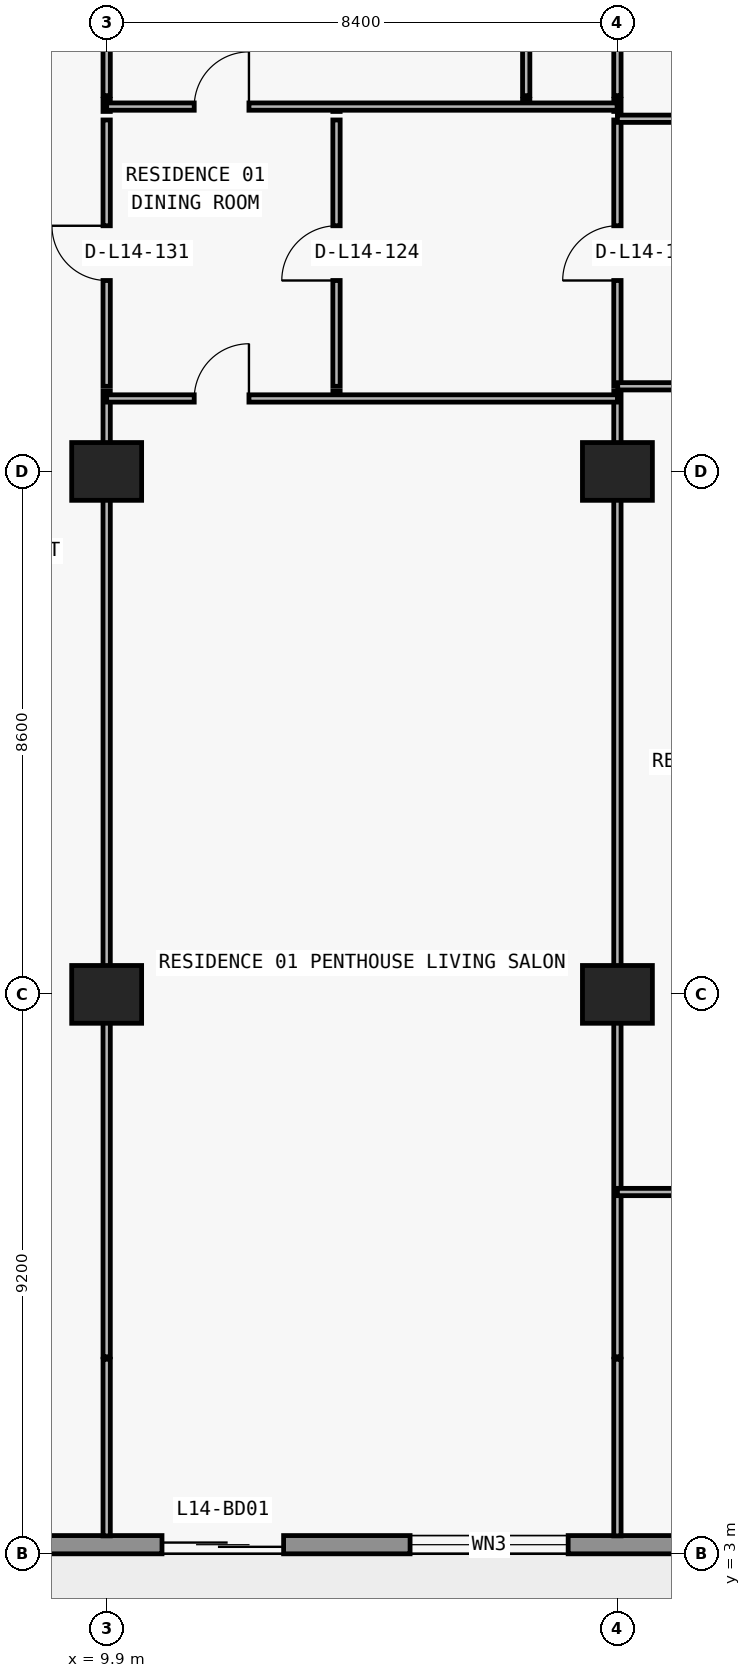
"""IFC4 building model, lengths in metres.
Left out: names, types, materials, properties, quantities, classifications, styles, units other than length and angle.
Written with IfcOpenShell. Run it as: python <this file> out.ifc"""

import sys

from ifc_helpers import new_model, si_unit, direction, frame, frame_2d, origin, origin_2d, place, context, subcontext, project, spatial, rectangle, extrude, element, fill, save


model = new_model("IFC4")
c1 = context("Model", 3, precision=1e-05, world=origin(), true_north=direction((0.0, 1.0)))
c2 = subcontext(c1, "Body", "Model", "MODEL_VIEW")
j1 = project(units=[si_unit("LENGTHUNIT", "METRE"), si_unit("PLANEANGLEUNIT", "RADIAN")], contexts=[c1])
p1 = place(None, origin())
s1 = spatial("IfcSite", under=j1, at=p1, CompositionType="ELEMENT")
p2 = place(p1, origin())
s2 = spatial("IfcBuilding", under=s1, at=p2, CompositionType="ELEMENT")
p3 = place(p2, frame((0.0, 0.0, 56.4)))
s3 = spatial("IfcBuildingStorey", under=s2, at=p3, CompositionType="ELEMENT", Elevation=56.4)
for number, where, z_axis, x_axis in (
    (1, (9.9, 12.2, 0.0), (0.0, 0.0, 1.0), (1.0, 0.0, 0.0)),
    (2, (18.3, 12.2, 0.0), (0.0, 0.0, 1.0), (1.0, 0.0, 0.0)),
    (3, (9.9, 20.8, 0.0), (0.0, 0.0, 1.0), (1.0, 0.0, 0.0)),
    (4, (18.3, 20.8, 0.0), (0.0, 0.0, 1.0), (1.0, 0.0, 0.0)),
):
    element("IfcColumn", number, at=place(p3, frame(where, z_axis=z_axis, x_axis=x_axis)), inside=s3, PredefinedType="COLUMN", context=c2, shape_type="SweptSolid", body=[
        extrude(rectangle(XDim=1.15, YDim=0.95, at=origin_2d()), origin(), (0.0, 0.0, 1.0), 3.05),
    ])
p4 = place(p3, frame((72.7, 3.15, 0.0), z_axis=(0.0, 0.0, 1.0), x_axis=(-1.0, 0.0, 0.0)))
e5 = element("IfcWall", 5, at=p4, inside=s3, PredefinedType="STANDARD", context=c2, shape_type="SweptSolid", body=[
    extrude(rectangle(XDim=67.6, YDim=0.3, at=frame_2d((33.8, 0.0))), origin(), (0.0, 0.0, 1.0), 3.05),
])
p5 = place(p4, frame((59.89, 0.0, 0.0)))
e6 = element("IfcOpeningElement", 6, at=p5, cuts=e5, PredefinedType="OPENING", context=c2, shape_type="SweptSolid", body=[
    extrude(rectangle(XDim=2.0, YDim=2.3, at=frame_2d((1.0, 1.15))), frame((0.0, 0.16, 0.0), z_axis=(0.0, -1.0, 0.0), x_axis=(1.0, 0.0, 0.0)), (0.0, 0.0, 1.0), 0.32),
])
p6 = place(p4, frame((55.21, 0.0, 0.65)))
e7 = element("IfcOpeningElement", 7, at=p6, cuts=e5, PredefinedType="OPENING", context=c2, shape_type="SweptSolid", body=[
    extrude(rectangle(XDim=2.6, YDim=1.85, at=frame_2d((1.3, 0.925))), frame((0.0, 0.16, 0.0), z_axis=(0.0, -1.0, 0.0), x_axis=(1.0, 0.0, 0.0)), (0.0, 0.0, 1.0), 0.32),
])
p7 = place(p4, frame((49.1, 0.0, 0.85)))
e8 = element("IfcOpeningElement", 8, at=p7, cuts=e5, PredefinedType="OPENING", context=c2, shape_type="SweptSolid", body=[
    extrude(rectangle(XDim=2.2, YDim=1.55, at=frame_2d((1.1, 0.775))), frame((0.0, 0.16, 0.0), z_axis=(0.0, -1.0, 0.0), x_axis=(1.0, 0.0, 0.0)), (0.0, 0.0, 1.0), 0.32),
])
p8 = place(p4, frame((43.09, 0.0, 0.0)))
e9 = element("IfcOpeningElement", 9, at=p8, cuts=e5, PredefinedType="OPENING", context=c2, shape_type="SweptSolid", body=[
    extrude(rectangle(XDim=2.0, YDim=2.3, at=frame_2d((1.0, 1.15))), frame((0.0, 0.16, 0.0), z_axis=(0.0, -1.0, 0.0), x_axis=(1.0, 0.0, 0.0)), (0.0, 0.0, 1.0), 0.32),
])
p9 = place(p4, frame((38.41, 0.0, 0.65)))
e10 = element("IfcOpeningElement", 10, at=p9, cuts=e5, PredefinedType="OPENING", context=c2, shape_type="SweptSolid", body=[
    extrude(rectangle(XDim=2.6, YDim=1.85, at=frame_2d((1.3, 0.925))), frame((0.0, 0.16, 0.0), z_axis=(0.0, -1.0, 0.0), x_axis=(1.0, 0.0, 0.0)), (0.0, 0.0, 1.0), 0.32),
])
p10 = place(p4, frame((32.7, 0.0, 0.85)))
e11 = element("IfcOpeningElement", 11, at=p10, cuts=e5, PredefinedType="OPENING", context=c2, shape_type="SweptSolid", body=[
    extrude(rectangle(XDim=2.2, YDim=1.55, at=frame_2d((1.1, 0.775))), frame((0.0, 0.16, 0.0), z_axis=(0.0, -1.0, 0.0), x_axis=(1.0, 0.0, 0.0)), (0.0, 0.0, 1.0), 0.32),
])
p11 = place(p4, frame((27.026, 0.0, 0.0)))
e12 = element("IfcOpeningElement", 12, at=p11, cuts=e5, PredefinedType="OPENING", context=c2, shape_type="SweptSolid", body=[
    extrude(rectangle(XDim=2.0, YDim=2.3, at=frame_2d((1.0, 1.15))), frame((0.0, 0.16, 0.0), z_axis=(0.0, -1.0, 0.0), x_axis=(1.0, 0.0, 0.0)), (0.0, 0.0, 1.0), 0.32),
])
p12 = place(p4, frame((22.726, 0.0, 0.85)))
e13 = element("IfcOpeningElement", 13, at=p12, cuts=e5, PredefinedType="OPENING", context=c2, shape_type="SweptSolid", body=[
    extrude(rectangle(XDim=2.2, YDim=1.55, at=frame_2d((1.1, 0.775))), frame((0.0, 0.16, 0.0), z_axis=(0.0, -1.0, 0.0), x_axis=(1.0, 0.0, 0.0)), (0.0, 0.0, 1.0), 0.32),
])
p13 = place(p4, frame((18.29, 0.0, 0.0)))
e14 = element("IfcOpeningElement", 14, at=p13, cuts=e5, PredefinedType="OPENING", context=c2, shape_type="SweptSolid", body=[
    extrude(rectangle(XDim=2.0, YDim=2.3, at=frame_2d((1.0, 1.15))), frame((0.0, 0.16, 0.0), z_axis=(0.0, -1.0, 0.0), x_axis=(1.0, 0.0, 0.0)), (0.0, 0.0, 1.0), 0.32),
])
p14 = place(p4, frame((14.19, 0.0, 0.85)))
e15 = element("IfcOpeningElement", 15, at=p14, cuts=e5, PredefinedType="OPENING", context=c2, shape_type="SweptSolid", body=[
    extrude(rectangle(XDim=1.8, YDim=1.55, at=frame_2d((0.9, 0.775))), frame((0.0, 0.16, 0.0), z_axis=(0.0, -1.0, 0.0), x_axis=(1.0, 0.0, 0.0)), (0.0, 0.0, 1.0), 0.32),
])
p15 = place(p4, frame((10.226, 0.0, 0.0)))
e16 = element("IfcOpeningElement", 16, at=p15, cuts=e5, PredefinedType="OPENING", context=c2, shape_type="SweptSolid", body=[
    extrude(rectangle(XDim=2.0, YDim=2.3, at=frame_2d((1.0, 1.15))), frame((0.0, 0.16, 0.0), z_axis=(0.0, -1.0, 0.0), x_axis=(1.0, 0.0, 0.0)), (0.0, 0.0, 1.0), 0.32),
])
p16 = place(p4, frame((5.926, 0.0, 0.85)))
e17 = element("IfcOpeningElement", 17, at=p16, cuts=e5, PredefinedType="OPENING", context=c2, shape_type="SweptSolid", body=[
    extrude(rectangle(XDim=2.2, YDim=1.55, at=frame_2d((1.1, 0.775))), frame((0.0, 0.16, 0.0), z_axis=(0.0, -1.0, 0.0), x_axis=(1.0, 0.0, 0.0)), (0.0, 0.0, 1.0), 0.32),
])
p17 = place(p3, frame((9.9, 3.295, 0.0), z_axis=(0.0, 0.0, 1.0), x_axis=(0.0, 1.0, 0.0)))
e18 = element("IfcWall", 18, at=p17, inside=s3, PredefinedType="PARTITIONING", context=c2, shape_type="SweptSolid", body=[
    extrude(rectangle(XDim=2.905, YDim=0.12, at=frame_2d((1.453, 0.0))), origin(), (0.0, 0.0, 1.0), 3.05),
])
p18 = place(p3, frame((9.9, 6.24, 0.0), z_axis=(0.0, 0.0, 1.0), x_axis=(0.0, 1.0, 0.0)))
e19 = element("IfcWall", 19, at=p18, inside=s3, PredefinedType="PARTITIONING", context=c2, shape_type="SweptSolid", body=[
    extrude(rectangle(XDim=15.88, YDim=0.12, at=frame_2d((7.94, 0.0))), origin(), (0.0, 0.0, 1.0), 2.11),
])
p19 = place(p3, frame((9.9, 22.2, 0.0), z_axis=(0.0, 0.0, 1.0), x_axis=(0.0, 1.0, 0.0)))
e20 = element("IfcWall", 20, at=p19, inside=s3, PredefinedType="PARTITIONING", context=c2, shape_type="SweptSolid", body=[
    extrude(rectangle(XDim=4.38, YDim=0.12, at=frame_2d((2.19, 0.0))), origin(), (0.0, 0.0, 1.0), 2.11),
])
p20 = place(p19, frame((1.74, 0.0, 0.0)))
e21 = element("IfcOpeningElement", 21, at=p20, cuts=e20, PredefinedType="OPENING", context=c2, shape_type="SweptSolid", body=[
    extrude(rectangle(XDim=0.9, YDim=2.06, at=frame_2d((0.45, 1.03))), frame((0.0, 0.07, 0.0), z_axis=(0.0, -1.0, 0.0), x_axis=(1.0, 0.0, 0.0)), (0.0, 0.0, 1.0), 0.14),
])
p21 = place(p3, frame((9.9, 26.72, 0.0), z_axis=(0.0, 0.0, 1.0), x_axis=(0.0, 1.0, 0.0)))
e22 = element("IfcWall", 22, at=p21, inside=s3, PredefinedType="PARTITIONING", context=c2, shape_type="SweptSolid", body=[
    extrude(rectangle(XDim=0.2, YDim=0.12, at=frame_2d((0.1, 0.0))), origin(), (0.0, 0.0, 1.0), 2.11),
])
p22 = place(p3, frame((9.9, 26.98, 0.0), z_axis=(0.0, 0.0, 1.0), x_axis=(0.0, 1.0, 0.0)))
e23 = element("IfcWall", 23, at=p22, inside=s3, PredefinedType="PARTITIONING", context=c2, shape_type="SweptSolid", body=[
    extrude(rectangle(XDim=6.82, YDim=0.12, at=frame_2d((3.41, 0.0))), origin(), (0.0, 0.0, 1.0), 2.11),
])
p23 = place(p3, frame((13.68, 22.0, 0.0), z_axis=(0.0, 0.0, 1.0), x_axis=(0.0, 1.0, 0.0)))
e24 = element("IfcWall", 24, at=p23, inside=s3, PredefinedType="PARTITIONING", context=c2, shape_type="SweptSolid", body=[
    extrude(rectangle(XDim=0.12, YDim=0.12, at=frame_2d((0.06, 0.0))), origin(), (0.0, 0.0, 1.0), 3.05),
])
p24 = place(p3, frame((13.68, 22.2, 0.0), z_axis=(0.0, 0.0, 1.0), x_axis=(0.0, 1.0, 0.0)))
e25 = element("IfcWall", 25, at=p24, inside=s3, PredefinedType="PARTITIONING", context=c2, shape_type="SweptSolid", body=[
    extrude(rectangle(XDim=4.38, YDim=0.12, at=frame_2d((2.19, 0.0))), origin(), (0.0, 0.0, 1.0), 3.05),
])
p25 = place(p24, frame((1.74, 0.0, 0.0)))
e26 = element("IfcOpeningElement", 26, at=p25, cuts=e25, PredefinedType="OPENING", context=c2, shape_type="SweptSolid", body=[
    extrude(rectangle(XDim=0.9, YDim=2.15, at=frame_2d((0.45, 1.075))), frame((0.0, 0.07, 0.0), z_axis=(0.0, -1.0, 0.0), x_axis=(1.0, 0.0, 0.0)), (0.0, 0.0, 1.0), 0.14),
])
p26 = place(p3, frame((13.68, 26.72, 0.0), z_axis=(0.0, 0.0, 1.0), x_axis=(0.0, 1.0, 0.0)))
e27 = element("IfcWall", 27, at=p26, inside=s3, PredefinedType="PARTITIONING", context=c2, shape_type="SweptSolid", body=[
    extrude(rectangle(XDim=0.08, YDim=0.12, at=frame_2d((0.04, 0.0))), origin(), (0.0, 0.0, 1.0), 3.05),
])
p27 = place(p3, frame((16.8, 26.8, 0.0), z_axis=(0.0, 0.0, 1.0), x_axis=(0.0, 1.0, 0.0)))
e28 = element("IfcWall", 28, at=p27, inside=s3, PredefinedType="PARTITIONING", context=c2, shape_type="SweptSolid", body=[
    extrude(rectangle(XDim=0.12, YDim=0.12, at=frame_2d((0.06, 0.0))), origin(), (0.0, 0.0, 1.0), 3.05),
])
p28 = place(p3, frame((16.8, 26.98, 0.0), z_axis=(0.0, 0.0, 1.0), x_axis=(0.0, 1.0, 0.0)))
e29 = element("IfcWall", 29, at=p28, inside=s3, PredefinedType="PARTITIONING", context=c2, shape_type="SweptSolid", body=[
    extrude(rectangle(XDim=6.82, YDim=0.12, at=frame_2d((3.41, 0.0))), origin(), (0.0, 0.0, 1.0), 3.05),
])
p29 = place(p28, frame((3.435, 0.0, 0.0)))
e30 = element("IfcOpeningElement", 30, at=p29, cuts=e29, PredefinedType="OPENING", context=c2, shape_type="SweptSolid", body=[
    extrude(rectangle(XDim=0.85, YDim=2.1, at=frame_2d((0.425, 1.05))), frame((0.0, 0.07, 0.0), z_axis=(0.0, -1.0, 0.0), x_axis=(1.0, 0.0, 0.0)), (0.0, 0.0, 1.0), 0.14),
])
p30 = place(p3, frame((18.3, 3.295, 0.0), z_axis=(0.0, 0.0, 1.0), x_axis=(0.0, 1.0, 0.0)))
e31 = element("IfcWall", 31, at=p30, inside=s3, PredefinedType="PARTITIONING", context=c2, shape_type="SweptSolid", body=[
    extrude(rectangle(XDim=2.905, YDim=0.12, at=frame_2d((1.453, 0.0))), origin(), (0.0, 0.0, 1.0), 3.05),
])
p31 = place(p3, frame((18.3, 6.24, 0.0), z_axis=(0.0, 0.0, 1.0), x_axis=(0.0, 1.0, 0.0)))
e32 = element("IfcWall", 32, at=p31, inside=s3, PredefinedType="PARTITIONING", context=c2, shape_type="SweptSolid", body=[
    extrude(rectangle(XDim=15.88, YDim=0.12, at=frame_2d((7.94, 0.0))), origin(), (0.0, 0.0, 1.0), 2.11),
])
p32 = place(p3, frame((18.3, 22.2, 0.0), z_axis=(0.0, 0.0, 1.0), x_axis=(0.0, 1.0, 0.0)))
e33 = element("IfcWall", 33, at=p32, inside=s3, PredefinedType="PARTITIONING", context=c2, shape_type="SweptSolid", body=[
    extrude(rectangle(XDim=4.38, YDim=0.12, at=frame_2d((2.19, 0.0))), origin(), (0.0, 0.0, 1.0), 2.11),
])
p33 = place(p32, frame((1.74, 0.0, 0.0)))
e34 = element("IfcOpeningElement", 34, at=p33, cuts=e33, PredefinedType="OPENING", context=c2, shape_type="SweptSolid", body=[
    extrude(rectangle(XDim=0.9, YDim=2.06, at=frame_2d((0.45, 1.03))), frame((0.0, 0.07, 0.0), z_axis=(0.0, -1.0, 0.0), x_axis=(1.0, 0.0, 0.0)), (0.0, 0.0, 1.0), 0.14),
])
p34 = place(p3, frame((18.3, 26.72, 0.0), z_axis=(0.0, 0.0, 1.0), x_axis=(0.0, 1.0, 0.0)))
e35 = element("IfcWall", 35, at=p34, inside=s3, PredefinedType="PARTITIONING", context=c2, shape_type="SweptSolid", body=[
    extrude(rectangle(XDim=0.2, YDim=0.12, at=frame_2d((0.1, 0.0))), origin(), (0.0, 0.0, 1.0), 2.11),
])
p35 = place(p3, frame((18.3, 26.98, 0.0), z_axis=(0.0, 0.0, 1.0), x_axis=(0.0, 1.0, 0.0)))
e36 = element("IfcWall", 36, at=p35, inside=s3, PredefinedType="PARTITIONING", context=c2, shape_type="SweptSolid", body=[
    extrude(rectangle(XDim=6.82, YDim=0.12, at=frame_2d((3.41, 0.0))), origin(), (0.0, 0.0, 1.0), 2.11),
])
p36 = place(p3, frame((18.3, 8.95, 0.0), z_axis=(0.0, 0.0, 1.0), x_axis=(1.0, 0.0, 0.0)))
e37 = element("IfcWall", 37, at=p36, inside=s3, PredefinedType="PARTITIONING", context=c2, shape_type="SweptSolid", body=[
    extrude(rectangle(XDim=8.4, YDim=0.12, at=frame_2d((4.2, 0.0))), origin(), (0.0, 0.0, 1.0), 3.05),
])
p37 = place(p36, frame((3.75, 0.0, 0.0)))
e38 = element("IfcOpeningElement", 38, at=p37, cuts=e37, PredefinedType="OPENING", context=c2, shape_type="SweptSolid", body=[
    extrude(rectangle(XDim=0.9, YDim=2.15, at=frame_2d((0.45, 1.075))), frame((0.0, 0.07, 0.0), z_axis=(0.0, -1.0, 0.0), x_axis=(1.0, 0.0, 0.0)), (0.0, 0.0, 1.0), 0.14),
])
p38 = place(p3, frame((9.9, 22.0, 0.0), z_axis=(0.0, 0.0, 1.0), x_axis=(1.0, 0.0, 0.0)))
e39 = element("IfcWall", 39, at=p38, inside=s3, PredefinedType="PARTITIONING", context=c2, shape_type="SweptSolid", body=[
    extrude(rectangle(XDim=8.4, YDim=0.12, at=frame_2d((4.2, 0.0))), origin(), (0.0, 0.0, 1.0), 3.05),
])
p39 = place(p38, frame((1.44, 0.0, 0.0)))
e40 = element("IfcOpeningElement", 40, at=p39, cuts=e39, PredefinedType="OPENING", context=c2, shape_type="SweptSolid", body=[
    extrude(rectangle(XDim=0.9, YDim=2.15, at=frame_2d((0.45, 1.075))), frame((0.0, 0.07, 0.0), z_axis=(0.0, -1.0, 0.0), x_axis=(1.0, 0.0, 0.0)), (0.0, 0.0, 1.0), 0.14),
])
p40 = place(p3, frame((18.305, 22.2, 0.0), z_axis=(0.0, 0.0, 1.0), x_axis=(1.0, 0.0, 0.0)))
e41 = element("IfcWall", 41, at=p40, inside=s3, PredefinedType="PARTITIONING", context=c2, shape_type="SweptSolid", body=[
    extrude(rectangle(XDim=8.125, YDim=0.12, at=frame_2d((4.062, 0.0))), origin(), (0.0, 0.0, 1.0), 3.05),
])
p41 = place(p40, frame((3.613, 0.0, 0.0)))
e42 = element("IfcOpeningElement", 42, at=p41, cuts=e41, PredefinedType="OPENING", context=c2, shape_type="SweptSolid", body=[
    extrude(rectangle(XDim=0.9, YDim=2.15, at=frame_2d((0.45, 1.075))), frame((0.0, 0.07, 0.0), z_axis=(0.0, -1.0, 0.0), x_axis=(1.0, 0.0, 0.0)), (0.0, 0.0, 1.0), 0.14),
])
p42 = place(p3, frame((18.3, 26.6, 0.0), z_axis=(0.0, 0.0, 1.0), x_axis=(1.0, 0.0, 0.0)))
e43 = element("IfcWall", 43, at=p42, inside=s3, PredefinedType="PARTITIONING", context=c2, shape_type="SweptSolid", body=[
    extrude(rectangle(XDim=8.13, YDim=0.12, at=frame_2d((4.065, 0.0))), origin(), (0.0, 0.0, 1.0), 3.05),
])
p43 = place(p42, frame((3.0, 0.0, 0.0)))
e44 = element("IfcOpeningElement", 44, at=p43, cuts=e43, PredefinedType="OPENING", context=c2, shape_type="SweptSolid", body=[
    extrude(rectangle(XDim=0.9, YDim=2.15, at=frame_2d((0.45, 1.075))), frame((0.0, 0.07, 0.0), z_axis=(0.0, -1.0, 0.0), x_axis=(1.0, 0.0, 0.0)), (0.0, 0.0, 1.0), 0.14),
])
p44 = place(p3, frame((9.9, 26.8, 0.0), z_axis=(0.0, 0.0, 1.0), x_axis=(1.0, 0.0, 0.0)))
e45 = element("IfcWall", 45, at=p44, inside=s3, PredefinedType="PARTITIONING", context=c2, shape_type="SweptSolid", body=[
    extrude(rectangle(XDim=8.395, YDim=0.12, at=frame_2d((4.198, 0.0))), origin(), (0.0, 0.0, 1.0), 3.05),
])
p45 = place(p44, frame((1.44, 0.0, 0.0)))
e46 = element("IfcOpeningElement", 46, at=p45, cuts=e45, PredefinedType="OPENING", context=c2, shape_type="SweptSolid", body=[
    extrude(rectangle(XDim=0.9, YDim=2.15, at=frame_2d((0.45, 1.075))), frame((0.0, 0.07, 0.0), z_axis=(0.0, -1.0, 0.0), x_axis=(1.0, 0.0, 0.0)), (0.0, 0.0, 1.0), 0.14),
])
p46 = place(p5, origin())
e47 = element("IfcDoor", 47, at=p46, inside=s3, OperationType="DOUBLE_DOOR_SLIDING", PredefinedType="DOOR", context=c2, shape_type="SweptSolid", body=[
    extrude(rectangle(XDim=2.0, YDim=2.3, at=frame_2d((1.0, 1.15))), frame((0.0, 0.025, 0.0), z_axis=(0.0, -1.0, 0.0), x_axis=(1.0, 0.0, 0.0)), (0.0, 0.0, 1.0), 0.05),
])
fill(e6, e47)
p47 = place(p6, origin())
e48 = element("IfcWindow", 48, at=p47, inside=s3, PartitioningType="SINGLE_PANEL", PredefinedType="WINDOW", context=c2, shape_type="SweptSolid", body=[
    extrude(rectangle(XDim=2.6, YDim=1.85, at=frame_2d((1.3, 0.925))), frame((0.0, 0.03, 0.0), z_axis=(0.0, -1.0, 0.0), x_axis=(1.0, 0.0, 0.0)), (0.0, 0.0, 1.0), 0.06),
])
fill(e7, e48)
p48 = place(p45, origin())
e49 = element("IfcDoor", 49, at=p48, inside=s3, OperationType="SINGLE_SWING_RIGHT", PredefinedType="DOOR", context=c2, shape_type="SweptSolid", body=[
    extrude(rectangle(XDim=0.9, YDim=2.15, at=frame_2d((0.45, 1.075))), frame((0.0, 0.025, 0.0), z_axis=(0.0, -1.0, 0.0), x_axis=(1.0, 0.0, 0.0)), (0.0, 0.0, 1.0), 0.05),
])
fill(e46, e49)
p49 = place(p25, origin())
e50 = element("IfcDoor", 50, at=p49, inside=s3, OperationType="SINGLE_SWING_LEFT", PredefinedType="DOOR", context=c2, shape_type="SweptSolid", body=[
    extrude(rectangle(XDim=0.9, YDim=2.15, at=frame_2d((0.45, 1.075))), frame((0.0, 0.025, 0.0), z_axis=(0.0, -1.0, 0.0), x_axis=(1.0, 0.0, 0.0)), (0.0, 0.0, 1.0), 0.05),
])
fill(e26, e50)
p50 = place(p39, origin())
e51 = element("IfcDoor", 51, at=p50, inside=s3, OperationType="SINGLE_SWING_RIGHT", PredefinedType="DOOR", context=c2, shape_type="SweptSolid", body=[
    extrude(rectangle(XDim=0.9, YDim=2.15, at=frame_2d((0.45, 1.075))), frame((0.0, 0.025, 0.0), z_axis=(0.0, -1.0, 0.0), x_axis=(1.0, 0.0, 0.0)), (0.0, 0.0, 1.0), 0.05),
])
fill(e40, e51)
p51 = place(p33, origin())
e52 = element("IfcDoor", 52, at=p51, inside=s3, OperationType="SINGLE_SWING_LEFT", PredefinedType="DOOR", context=c2, shape_type="SweptSolid", body=[
    extrude(rectangle(XDim=0.9, YDim=2.06, at=frame_2d((0.45, 1.03))), frame((0.0, 0.025, 0.0), z_axis=(0.0, -1.0, 0.0), x_axis=(1.0, 0.0, 0.0)), (0.0, 0.0, 1.0), 0.05),
])
fill(e34, e52)
p52 = place(p20, origin())
e53 = element("IfcDoor", 53, at=p52, inside=s3, OperationType="SINGLE_SWING_RIGHT", PredefinedType="DOOR", context=c2, shape_type="SweptSolid", body=[
    extrude(rectangle(XDim=0.9, YDim=2.06, at=frame_2d((0.45, 1.03))), frame((0.0, 0.025, 0.0), z_axis=(0.0, -1.0, 0.0), x_axis=(1.0, 0.0, 0.0)), (0.0, 0.0, 1.0), 0.05),
])
fill(e21, e53)
save(model, sys.argv[1])
